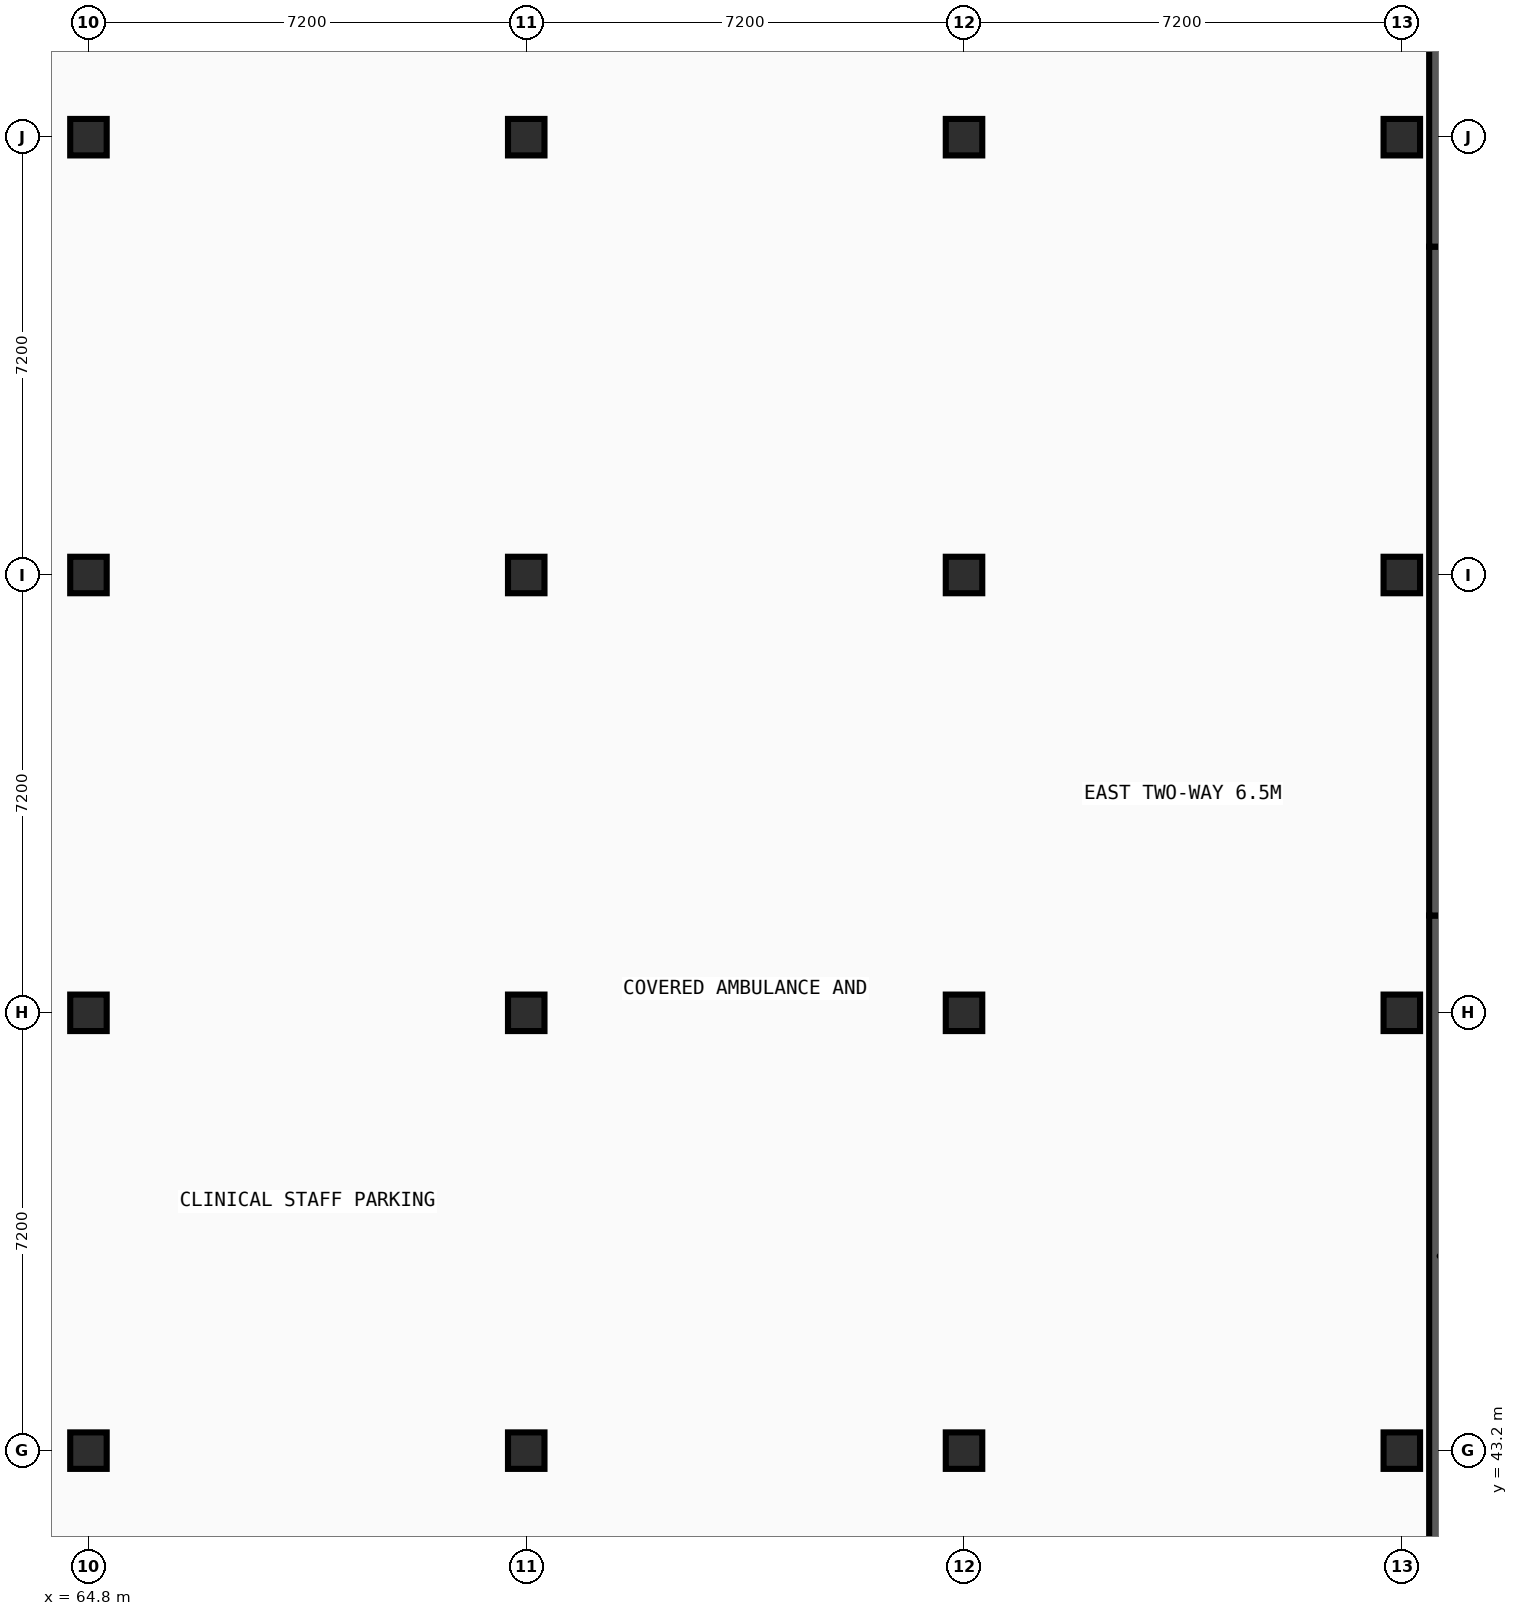
"""IFC4 building model, lengths in metres.
Left out: names, types, materials, properties, quantities, classifications, styles, units other than length and angle.
Written with IfcOpenShell. Run it as: python <this file> out.ifc"""

import sys

from ifc_helpers import new_model, si_unit, direction, frame, frame_2d, origin, origin_2d, place, context, subcontext, project, spatial, rectangle, extrude, element, save


model = new_model("IFC4")
c1 = context("Model", 3, precision=1e-05, world=origin(), true_north=direction((0.0, 1.0)))
c2 = subcontext(c1, "Body", "Model", "MODEL_VIEW")
j1 = project(units=[si_unit("LENGTHUNIT", "METRE"), si_unit("PLANEANGLEUNIT", "RADIAN")], contexts=[c1])
p1 = place(None, origin())
s1 = spatial("IfcSite", under=j1, at=p1, CompositionType="ELEMENT")
p2 = place(p1, origin())
s2 = spatial("IfcBuilding", under=s1, at=p2, CompositionType="ELEMENT")
p3 = place(p2, frame((0.0, 0.0, -4.8)))
s3 = spatial("IfcBuildingStorey", under=s2, at=p3, CompositionType="ELEMENT", Elevation=-4.8)
for number, where, z_axis, x_axis in (
    (1, (64.8, 43.2, 0.0), (0.0, 0.0, 1.0), (1.0, 0.0, 0.0)),
    (2, (64.8, 50.4, 0.0), (0.0, 0.0, 1.0), (1.0, 0.0, 0.0)),
    (3, (64.8, 57.6, 0.0), (0.0, 0.0, 1.0), (1.0, 0.0, 0.0)),
    (4, (64.8, 64.8, 0.0), (0.0, 0.0, 1.0), (1.0, 0.0, 0.0)),
    (5, (72.0, 43.2, 0.0), (0.0, 0.0, 1.0), (1.0, 0.0, 0.0)),
    (6, (72.0, 50.4, 0.0), (0.0, 0.0, 1.0), (1.0, 0.0, 0.0)),
    (7, (72.0, 57.6, 0.0), (0.0, 0.0, 1.0), (1.0, 0.0, 0.0)),
    (8, (72.0, 64.8, 0.0), (0.0, 0.0, 1.0), (1.0, 0.0, 0.0)),
    (9, (79.2, 43.2, 0.0), (0.0, 0.0, 1.0), (1.0, 0.0, 0.0)),
    (10, (79.2, 50.4, 0.0), (0.0, 0.0, 1.0), (1.0, 0.0, 0.0)),
    (11, (79.2, 57.6, 0.0), (0.0, 0.0, 1.0), (1.0, 0.0, 0.0)),
    (12, (79.2, 64.8, 0.0), (0.0, 0.0, 1.0), (1.0, 0.0, 0.0)),
    (13, (86.4, 43.2, 0.0), (0.0, 0.0, 1.0), (1.0, 0.0, 0.0)),
    (14, (86.4, 50.4, 0.0), (0.0, 0.0, 1.0), (1.0, 0.0, 0.0)),
    (15, (86.4, 57.6, 0.0), (0.0, 0.0, 1.0), (1.0, 0.0, 0.0)),
    (16, (86.4, 64.8, 0.0), (0.0, 0.0, 1.0), (1.0, 0.0, 0.0)),
):
    element("IfcColumn", number, at=place(p3, frame(where, z_axis=z_axis, x_axis=x_axis)), inside=s3, PredefinedType="COLUMN", context=c2, shape_type="SweptSolid", body=[
        extrude(rectangle(XDim=0.6, YDim=0.6, at=origin_2d()), origin(), (0.0, 0.0, 1.0), 4.8),
    ])
p4 = place(p3, frame((87.025, 40.8, 0.0), z_axis=(0.0, 0.0, 1.0), x_axis=(0.0, 1.0, 0.0)))
e17 = element("IfcWall", 17, at=p4, inside=s3, PredefinedType="USERDEFINED", context=c2, shape_type="SweptSolid", body=[
    extrude(rectangle(XDim=11.2, YDim=0.35, at=frame_2d((5.6, 0.0))), origin(), (0.0, 0.0, 1.0), 4.58),
])
p5 = place(p3, frame((87.025, 52.0, 0.0), z_axis=(0.0, 0.0, 1.0), x_axis=(0.0, 1.0, 0.0)))
e18 = element("IfcWall", 18, at=p5, inside=s3, PredefinedType="USERDEFINED", context=c2, shape_type="SweptSolid", body=[
    extrude(rectangle(XDim=11.0, YDim=0.35, at=frame_2d((5.5, 0.0))), origin(), (0.0, 0.0, 1.0), 4.58),
])
p6 = place(p3, frame((87.025, 63.0, 0.0), z_axis=(0.0, 0.0, 1.0), x_axis=(0.0, 1.0, 0.0)))
e19 = element("IfcWall", 19, at=p6, inside=s3, PredefinedType="USERDEFINED", context=c2, shape_type="SweptSolid", body=[
    extrude(rectangle(XDim=15.8, YDim=0.35, at=frame_2d((7.9, 0.0))), origin(), (0.0, 0.0, 1.0), 4.58),
])
save(model, sys.argv[1])
